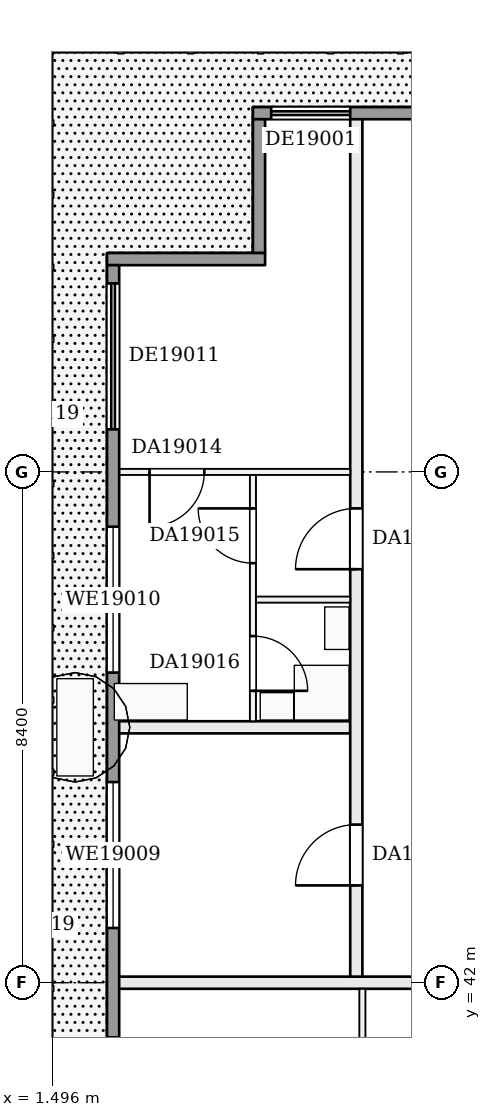
"""IFC4 building model, lengths in metres.
Left out: names, types, materials, properties, quantities, classifications, styles, units other than length and angle.
Written with IfcOpenShell. Run it as: python <this file> out.ifc"""

import sys

from ifc_helpers import new_model, si_unit, direction, frame, frame_2d, origin, place, context, subcontext, project, spatial, rectangle, extrude, element, fill, save


model = new_model("IFC4")
c1 = context("Model", 3, precision=1e-05, world=origin(), true_north=direction((0.0, 1.0)))
c2 = subcontext(c1, "Body", "Model", "MODEL_VIEW")
j1 = project(units=[si_unit("LENGTHUNIT", "METRE"), si_unit("PLANEANGLEUNIT", "RADIAN")], contexts=[c1])
p1 = place(None, origin())
s1 = spatial("IfcSite", under=j1, at=p1, CompositionType="ELEMENT")
p2 = place(p1, origin())
s2 = spatial("IfcBuilding", under=s1, at=p2, CompositionType="ELEMENT")
p3 = place(p2, frame((0.0, 0.0, 81.2)))
s3 = spatial("IfcBuildingStorey", under=s2, at=p3, CompositionType="ELEMENT", Elevation=81.2)
p4 = place(p3, frame((2.5, 42.0, 0.0), z_axis=(0.0, 0.0, 1.0), x_axis=(1.0, 0.0, 0.0)))
e1 = element("IfcWall", 1, at=p4, inside=s3, PredefinedType="PARTITIONING", context=c2, shape_type="SweptSolid", body=[
    extrude(rectangle(XDim=5.9, YDim=0.2, at=frame_2d((2.95, 0.0))), origin(), (0.0, 0.0, 1.0), 3.22),
])
p5 = place(p3, frame((2.5, 46.2, 0.0), z_axis=(0.0, 0.0, 1.0), x_axis=(1.0, 0.0, 0.0)))
e2 = element("IfcWall", 2, at=p5, inside=s3, PredefinedType="PARTITIONING", context=c2, shape_type="SweptSolid", body=[
    extrude(rectangle(XDim=3.9, YDim=0.2, at=frame_2d((1.95, 0.0))), origin(), (0.0, 0.0, 1.0), 3.22),
])
p6 = place(p3, frame((4.85, 48.3, 0.0), z_axis=(0.0, 0.0, 1.0), x_axis=(1.0, 0.0, 0.0)))
e3 = element("IfcWall", 3, at=p6, inside=s3, PredefinedType="PARTITIONING", context=c2, shape_type="SweptSolid", body=[
    extrude(rectangle(XDim=1.55, YDim=0.1, at=frame_2d((0.775, 0.0))), origin(), (0.0, 0.0, 1.0), 3.22),
])
p7 = place(p3, frame((2.5, 50.4, 0.0), z_axis=(0.0, 0.0, 1.0), x_axis=(1.0, 0.0, 0.0)))
e4 = element("IfcWall", 4, at=p7, inside=s3, PredefinedType="PARTITIONING", context=c2, shape_type="SweptSolid", body=[
    extrude(rectangle(XDim=3.9, YDim=0.1, at=frame_2d((1.95, 0.0))), origin(), (0.0, 0.0, 1.0), 3.22),
])
p8 = place(p7, frame((0.6, 0.0, 0.0)))
e5 = element("IfcOpeningElement", 5, at=p8, cuts=e4, PredefinedType="OPENING", context=c2, shape_type="SweptSolid", body=[
    extrude(rectangle(XDim=0.9, YDim=2.1, at=frame_2d((0.45, 1.05))), frame((0.0, 0.06, 0.0), z_axis=(0.0, -1.0, 0.0), x_axis=(1.0, 0.0, 0.0)), (0.0, 0.0, 1.0), 0.12),
])
p9 = place(p3, frame((4.8, 46.3, 0.0), z_axis=(0.0, 0.0, 1.0), x_axis=(0.0, 1.0, 0.0)))
e6 = element("IfcWall", 6, at=p9, inside=s3, PredefinedType="PARTITIONING", context=c2, shape_type="SweptSolid", body=[
    extrude(rectangle(XDim=4.05, YDim=0.1, at=frame_2d((2.025, 0.0))), origin(), (0.0, 0.0, 1.0), 3.22),
])
p10 = place(p9, frame((2.6, 0.0, 0.0)))
e7 = element("IfcOpeningElement", 7, at=p10, cuts=e6, PredefinedType="OPENING", context=c2, shape_type="SweptSolid", body=[
    extrude(rectangle(XDim=0.9, YDim=2.1, at=frame_2d((0.45, 1.05))), frame((0.0, 0.06, 0.0), z_axis=(0.0, -1.0, 0.0), x_axis=(1.0, 0.0, 0.0)), (0.0, 0.0, 1.0), 0.12),
])
p11 = place(p9, frame((0.5, 0.0, 0.0)))
e8 = element("IfcOpeningElement", 8, at=p11, cuts=e6, PredefinedType="OPENING", context=c2, shape_type="SweptSolid", body=[
    extrude(rectangle(XDim=0.9, YDim=2.1, at=frame_2d((0.45, 1.05))), frame((0.0, 0.06, 0.0), z_axis=(0.0, -1.0, 0.0), x_axis=(1.0, 0.0, 0.0)), (0.0, 0.0, 1.0), 0.12),
])
p12 = place(p3, frame((6.5, 42.1, 0.0), z_axis=(0.0, 0.0, 1.0), x_axis=(0.0, 1.0, 0.0)))
e9 = element("IfcWall", 9, at=p12, inside=s3, PredefinedType="PARTITIONING", context=c2, shape_type="SweptSolid", body=[
    extrude(rectangle(XDim=14.2, YDim=0.2, at=frame_2d((7.1, 0.0))), origin(), (0.0, 0.0, 1.0), 3.22),
])
p13 = place(p12, frame((1.5, 0.0, 0.0)))
e10 = element("IfcOpeningElement", 10, at=p13, cuts=e9, PredefinedType="OPENING", context=c2, shape_type="SweptSolid", body=[
    extrude(rectangle(XDim=1.0, YDim=2.1, at=frame_2d((0.5, 1.05))), frame((0.0, 0.11, 0.0), z_axis=(0.0, -1.0, 0.0), x_axis=(1.0, 0.0, 0.0)), (0.0, 0.0, 1.0), 0.22),
])
p14 = place(p12, frame((6.7, 0.0, 0.0)))
e11 = element("IfcOpeningElement", 11, at=p14, cuts=e9, PredefinedType="OPENING", context=c2, shape_type="SweptSolid", body=[
    extrude(rectangle(XDim=1.0, YDim=2.1, at=frame_2d((0.5, 1.05))), frame((0.0, 0.11, 0.0), z_axis=(0.0, -1.0, 0.0), x_axis=(1.0, 0.0, 0.0)), (0.0, 0.0, 1.0), 0.22),
])
p15 = place(p3, frame((6.6, 16.85, 0.0), z_axis=(0.0, 0.0, 1.0), x_axis=(0.0, 1.0, 0.0)))
e12 = element("IfcWall", 12, at=p15, inside=s3, PredefinedType="PARTITIONING", context=c2, shape_type="SweptSolid", body=[
    extrude(rectangle(XDim=25.05, YDim=0.1, at=frame_2d((12.525, 0.0))), origin(), (0.0, 0.0, 1.0), 3.22),
])
p16 = place(p15, frame((1.55, 0.0, 0.0)))
e13 = element("IfcOpeningElement", 13, at=p16, cuts=e12, PredefinedType="OPENING", context=c2, shape_type="SweptSolid", body=[
    extrude(rectangle(XDim=0.9, YDim=2.1, at=frame_2d((0.45, 1.05))), frame((0.0, 0.06, 0.0), z_axis=(0.0, -1.0, 0.0), x_axis=(1.0, 0.0, 0.0)), (0.0, 0.0, 1.0), 0.12),
])
p17 = place(p15, frame((5.75, 0.0, 0.0)))
e14 = element("IfcOpeningElement", 14, at=p17, cuts=e12, PredefinedType="OPENING", context=c2, shape_type="SweptSolid", body=[
    extrude(rectangle(XDim=0.9, YDim=2.1, at=frame_2d((0.45, 1.05))), frame((0.0, 0.06, 0.0), z_axis=(0.0, -1.0, 0.0), x_axis=(1.0, 0.0, 0.0)), (0.0, 0.0, 1.0), 0.12),
])
p18 = place(p15, frame((9.95, 0.0, 0.0)))
e15 = element("IfcOpeningElement", 15, at=p18, cuts=e12, PredefinedType="OPENING", context=c2, shape_type="SweptSolid", body=[
    extrude(rectangle(XDim=0.9, YDim=2.1, at=frame_2d((0.45, 1.05))), frame((0.0, 0.06, 0.0), z_axis=(0.0, -1.0, 0.0), x_axis=(1.0, 0.0, 0.0)), (0.0, 0.0, 1.0), 0.12),
])
p19 = place(p15, frame((14.15, 0.0, 0.0)))
e16 = element("IfcOpeningElement", 16, at=p19, cuts=e12, PredefinedType="OPENING", context=c2, shape_type="SweptSolid", body=[
    extrude(rectangle(XDim=0.9, YDim=2.1, at=frame_2d((0.45, 1.05))), frame((0.0, 0.06, 0.0), z_axis=(0.0, -1.0, 0.0), x_axis=(1.0, 0.0, 0.0)), (0.0, 0.0, 1.0), 0.12),
])
p20 = place(p15, frame((20.45, 0.0, 0.0)))
e17 = element("IfcOpeningElement", 17, at=p20, cuts=e12, PredefinedType="OPENING", context=c2, shape_type="SweptSolid", body=[
    extrude(rectangle(XDim=0.9, YDim=2.1, at=frame_2d((0.45, 1.05))), frame((0.0, 0.06, 0.0), z_axis=(0.0, -1.0, 0.0), x_axis=(1.0, 0.0, 0.0)), (0.0, 0.0, 1.0), 0.12),
])
p21 = place(p3, frame((8.4, 56.3, 0.0), z_axis=(0.0, 0.0, 1.0), x_axis=(-1.0, 0.0, 0.0)))
e18 = element("IfcWall", 18, at=p21, inside=s3, PredefinedType="SOLIDWALL", context=c2, shape_type="SweptSolid", body=[
    extrude(rectangle(XDim=3.6, YDim=0.2, at=frame_2d((1.8, 0.0))), origin(), (0.0, 0.0, 1.0), 3.22),
])
p22 = place(p21, frame((2.0, 0.0, 0.0)))
e19 = element("IfcOpeningElement", 19, at=p22, cuts=e18, PredefinedType="OPENING", context=c2, shape_type="SweptSolid", body=[
    extrude(rectangle(XDim=1.3, YDim=2.2, at=frame_2d((0.65, 1.1))), frame((0.0, 0.11, 0.0), z_axis=(0.0, -1.0, 0.0), x_axis=(1.0, 0.0, 0.0)), (0.0, 0.0, 1.0), 0.22),
])
p23 = place(p3, frame((4.9, 56.2, 0.0), z_axis=(0.0, 0.0, 1.0), x_axis=(0.0, -1.0, 0.0)))
e20 = element("IfcWall", 20, at=p23, inside=s3, PredefinedType="SOLIDWALL", context=c2, shape_type="SweptSolid", body=[
    extrude(rectangle(XDim=2.2, YDim=0.2, at=frame_2d((1.1, 0.0))), origin(), (0.0, 0.0, 1.0), 3.22),
])
p24 = place(p3, frame((5.0, 53.9, 0.0), z_axis=(0.0, 0.0, 1.0), x_axis=(-1.0, 0.0, 0.0)))
e21 = element("IfcWall", 21, at=p24, inside=s3, PredefinedType="SOLIDWALL", context=c2, shape_type="SweptSolid", body=[
    extrude(rectangle(XDim=2.6, YDim=0.2, at=frame_2d((1.3, 0.0))), origin(), (0.0, 0.0, 1.0), 3.22),
])
p25 = place(p3, frame((2.5, 53.8, 0.0), z_axis=(0.0, 0.0, 1.0), x_axis=(0.0, -1.0, 0.0)))
e22 = element("IfcWall", 22, at=p25, inside=s3, PredefinedType="SOLIDWALL", context=c2, shape_type="SweptSolid", body=[
    extrude(rectangle(XDim=40.4, YDim=0.2, at=frame_2d((20.2, 0.0))), origin(), (0.0, 0.0, 1.0), 3.22),
])
p26 = place(p25, frame((37.7, 0.0, 0.9)))
e23 = element("IfcOpeningElement", 23, at=p26, cuts=e22, PredefinedType="OPENING", context=c2, shape_type="SweptSolid", body=[
    extrude(rectangle(XDim=2.4, YDim=1.5, at=frame_2d((1.2, 0.75))), frame((0.0, 0.11, 0.0), z_axis=(0.0, -1.0, 0.0), x_axis=(1.0, 0.0, 0.0)), (0.0, 0.0, 1.0), 0.22),
])
p27 = place(p25, frame((33.7, 0.0, 0.9)))
e24 = element("IfcOpeningElement", 24, at=p27, cuts=e22, PredefinedType="OPENING", context=c2, shape_type="SweptSolid", body=[
    extrude(rectangle(XDim=2.4, YDim=1.5, at=frame_2d((1.2, 0.75))), frame((0.0, 0.11, 0.0), z_axis=(0.0, -1.0, 0.0), x_axis=(1.0, 0.0, 0.0)), (0.0, 0.0, 1.0), 0.22),
])
p28 = place(p25, frame((29.5, 0.0, 0.9)))
e25 = element("IfcOpeningElement", 25, at=p28, cuts=e22, PredefinedType="OPENING", context=c2, shape_type="SweptSolid", body=[
    extrude(rectangle(XDim=2.4, YDim=1.5, at=frame_2d((1.2, 0.75))), frame((0.0, 0.11, 0.0), z_axis=(0.0, -1.0, 0.0), x_axis=(1.0, 0.0, 0.0)), (0.0, 0.0, 1.0), 0.22),
])
p29 = place(p25, frame((25.3, 0.0, 0.9)))
e26 = element("IfcOpeningElement", 26, at=p29, cuts=e22, PredefinedType="OPENING", context=c2, shape_type="SweptSolid", body=[
    extrude(rectangle(XDim=2.4, YDim=1.5, at=frame_2d((1.2, 0.75))), frame((0.0, 0.11, 0.0), z_axis=(0.0, -1.0, 0.0), x_axis=(1.0, 0.0, 0.0)), (0.0, 0.0, 1.0), 0.22),
])
p30 = place(p25, frame((21.1, 0.0, 0.9)))
e27 = element("IfcOpeningElement", 27, at=p30, cuts=e22, PredefinedType="OPENING", context=c2, shape_type="SweptSolid", body=[
    extrude(rectangle(XDim=2.4, YDim=1.5, at=frame_2d((1.2, 0.75))), frame((0.0, 0.11, 0.0), z_axis=(0.0, -1.0, 0.0), x_axis=(1.0, 0.0, 0.0)), (0.0, 0.0, 1.0), 0.22),
])
p31 = place(p25, frame((16.9, 0.0, 0.0)))
e28 = element("IfcOpeningElement", 28, at=p31, cuts=e22, PredefinedType="OPENING", context=c2, shape_type="SweptSolid", body=[
    extrude(rectangle(XDim=2.4, YDim=2.2, at=frame_2d((1.2, 1.1))), frame((0.0, 0.11, 0.0), z_axis=(0.0, -1.0, 0.0), x_axis=(1.0, 0.0, 0.0)), (0.0, 0.0, 1.0), 0.22),
])
p32 = place(p25, frame((12.7, 0.0, 0.0)))
e29 = element("IfcOpeningElement", 29, at=p32, cuts=e22, PredefinedType="OPENING", context=c2, shape_type="SweptSolid", body=[
    extrude(rectangle(XDim=2.4, YDim=2.2, at=frame_2d((1.2, 1.1))), frame((0.0, 0.11, 0.0), z_axis=(0.0, -1.0, 0.0), x_axis=(1.0, 0.0, 0.0)), (0.0, 0.0, 1.0), 0.22),
])
p33 = place(p25, frame((8.5, 0.0, 0.9)))
e30 = element("IfcOpeningElement", 30, at=p33, cuts=e22, PredefinedType="OPENING", context=c2, shape_type="SweptSolid", body=[
    extrude(rectangle(XDim=2.4, YDim=1.5, at=frame_2d((1.2, 0.75))), frame((0.0, 0.11, 0.0), z_axis=(0.0, -1.0, 0.0), x_axis=(1.0, 0.0, 0.0)), (0.0, 0.0, 1.0), 0.22),
])
p34 = place(p25, frame((4.3, 0.0, 0.9)))
e31 = element("IfcOpeningElement", 31, at=p34, cuts=e22, PredefinedType="OPENING", context=c2, shape_type="SweptSolid", body=[
    extrude(rectangle(XDim=2.4, YDim=1.5, at=frame_2d((1.2, 0.75))), frame((0.0, 0.11, 0.0), z_axis=(0.0, -1.0, 0.0), x_axis=(1.0, 0.0, 0.0)), (0.0, 0.0, 1.0), 0.22),
])
p35 = place(p25, frame((0.3, 0.0, 0.0)))
e32 = element("IfcOpeningElement", 32, at=p35, cuts=e22, PredefinedType="OPENING", context=c2, shape_type="SweptSolid", body=[
    extrude(rectangle(XDim=2.4, YDim=2.2, at=frame_2d((1.2, 1.1))), frame((0.0, 0.11, 0.0), z_axis=(0.0, -1.0, 0.0), x_axis=(1.0, 0.0, 0.0)), (0.0, 0.0, 1.0), 0.22),
])
p36 = place(p8, frame((0.9, 0.0, 0.0), z_axis=(0.0, 0.0, 1.0), x_axis=(-1.0, 0.0, 0.0)))
e33 = element("IfcDoor", 33, at=p36, inside=s3, OperationType="SINGLE_SWING_RIGHT", PredefinedType="DOOR", context=c2, shape_type="SweptSolid", body=[
    extrude(rectangle(XDim=0.9, YDim=2.1, at=frame_2d((0.45, 1.05))), frame((0.0, 0.025, 0.0), z_axis=(0.0, -1.0, 0.0), x_axis=(1.0, 0.0, 0.0)), (0.0, 0.0, 1.0), 0.05),
])
fill(e5, e33)
p37 = place(p10, origin())
e34 = element("IfcDoor", 34, at=p37, inside=s3, OperationType="SINGLE_SWING_RIGHT", PredefinedType="DOOR", context=c2, shape_type="SweptSolid", body=[
    extrude(rectangle(XDim=0.9, YDim=2.1, at=frame_2d((0.45, 1.05))), frame((0.0, 0.025, 0.0), z_axis=(0.0, -1.0, 0.0), x_axis=(1.0, 0.0, 0.0)), (0.0, 0.0, 1.0), 0.05),
])
fill(e7, e34)
p38 = place(p11, frame((0.9, 0.0, 0.0), z_axis=(0.0, 0.0, 1.0), x_axis=(-1.0, 0.0, 0.0)))
e35 = element("IfcDoor", 35, at=p38, inside=s3, OperationType="SINGLE_SWING_RIGHT", PredefinedType="DOOR", context=c2, shape_type="SweptSolid", body=[
    extrude(rectangle(XDim=0.9, YDim=2.1, at=frame_2d((0.45, 1.05))), frame((0.0, 0.025, 0.0), z_axis=(0.0, -1.0, 0.0), x_axis=(1.0, 0.0, 0.0)), (0.0, 0.0, 1.0), 0.05),
])
fill(e8, e35)
p39 = place(p13, origin())
e36 = element("IfcDoor", 36, at=p39, inside=s3, OperationType="SINGLE_SWING_LEFT", PredefinedType="DOOR", context=c2, shape_type="SweptSolid", body=[
    extrude(rectangle(XDim=1.0, YDim=2.1, at=frame_2d((0.5, 1.05))), frame((0.0, 0.025, 0.0), z_axis=(0.0, -1.0, 0.0), x_axis=(1.0, 0.0, 0.0)), (0.0, 0.0, 1.0), 0.05),
])
fill(e10, e36)
p40 = place(p14, origin())
e37 = element("IfcDoor", 37, at=p40, inside=s3, OperationType="SINGLE_SWING_LEFT", PredefinedType="DOOR", context=c2, shape_type="SweptSolid", body=[
    extrude(rectangle(XDim=1.0, YDim=2.1, at=frame_2d((0.5, 1.05))), frame((0.0, 0.025, 0.0), z_axis=(0.0, -1.0, 0.0), x_axis=(1.0, 0.0, 0.0)), (0.0, 0.0, 1.0), 0.05),
])
fill(e11, e37)
p41 = place(p22, origin())
e38 = element("IfcDoor", 38, at=p41, inside=s3, OperationType="DOUBLE_DOOR_SLIDING", PredefinedType="DOOR", context=c2, shape_type="SweptSolid", body=[
    extrude(rectangle(XDim=1.3, YDim=2.2, at=frame_2d((0.65, 1.1))), frame((0.0, 0.025, 0.0), z_axis=(0.0, -1.0, 0.0), x_axis=(1.0, 0.0, 0.0)), (0.0, 0.0, 1.0), 0.05),
])
fill(e19, e38)
p42 = place(p33, origin())
e39 = element("IfcWindow", 39, at=p42, inside=s3, PartitioningType="SINGLE_PANEL", PredefinedType="WINDOW", context=c2, shape_type="SweptSolid", body=[
    extrude(rectangle(XDim=2.4, YDim=1.5, at=frame_2d((1.2, 0.75))), frame((0.0, 0.03, 0.0), z_axis=(0.0, -1.0, 0.0), x_axis=(1.0, 0.0, 0.0)), (0.0, 0.0, 1.0), 0.06),
])
fill(e30, e39)
p43 = place(p34, origin())
e40 = element("IfcWindow", 40, at=p43, inside=s3, PartitioningType="SINGLE_PANEL", PredefinedType="WINDOW", context=c2, shape_type="SweptSolid", body=[
    extrude(rectangle(XDim=2.4, YDim=1.5, at=frame_2d((1.2, 0.75))), frame((0.0, 0.03, 0.0), z_axis=(0.0, -1.0, 0.0), x_axis=(1.0, 0.0, 0.0)), (0.0, 0.0, 1.0), 0.06),
])
fill(e31, e40)
p44 = place(p35, origin())
e41 = element("IfcDoor", 41, at=p44, inside=s3, OperationType="DOUBLE_DOOR_SLIDING", PredefinedType="DOOR", context=c2, shape_type="SweptSolid", body=[
    extrude(rectangle(XDim=2.4, YDim=2.2, at=frame_2d((1.2, 1.1))), frame((0.0, 0.025, 0.0), z_axis=(0.0, -1.0, 0.0), x_axis=(1.0, 0.0, 0.0)), (0.0, 0.0, 1.0), 0.05),
])
fill(e32, e41)
save(model, sys.argv[1])
